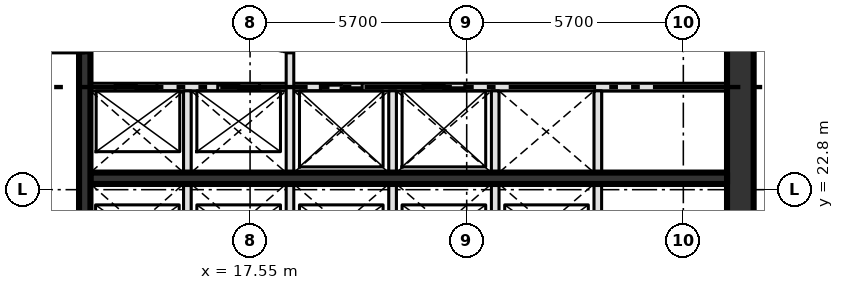
"""IFC4 building model, lengths in metres.
Left out: names, types, materials, properties, quantities, classifications, styles, units other than length and angle.
Written with IfcOpenShell. Run it as: python <this file> out.ifc"""

import sys

from ifc_helpers import new_model, si_unit, direction, frame, frame_2d, origin, place, context, subcontext, project, spatial, rectangle, extrude, element, fill, save


model = new_model("IFC4")
c1 = context("Model", 3, precision=1e-05, world=origin(), true_north=direction((0.0, 1.0)))
c2 = subcontext(c1, "Body", "Model", "MODEL_VIEW")
j1 = project(units=[si_unit("LENGTHUNIT", "METRE"), si_unit("PLANEANGLEUNIT", "RADIAN")], contexts=[c1])
p1 = place(None, origin())
s1 = spatial("IfcSite", under=j1, at=p1, CompositionType="ELEMENT")
p2 = place(p1, origin())
s2 = spatial("IfcBuilding", under=s1, at=p2, CompositionType="ELEMENT")
p3 = place(p2, frame((0.0, 0.0, 259.2)))
s3 = spatial("IfcBuildingStorey", under=s2, at=p3, CompositionType="ELEMENT", Elevation=259.2)
p4 = place(p3, frame((30.45, 14.8, -0.3), z_axis=(0.0, 0.0, 1.0), x_axis=(0.0, 1.0, 0.0)))
e1 = element("IfcWall", 1, at=p4, inside=s3, PredefinedType="SHEAR", context=c2, shape_type="SweptSolid", body=[
    extrude(rectangle(XDim=20.9, YDim=0.7, at=frame_2d((10.45, 0.0))), origin(), (0.0, 0.0, 1.0), 4.2),
])
p5 = place(p3, frame((13.35, 23.1, 0.0), z_axis=(0.0, 0.0, 1.0), x_axis=(1.0, 0.0, 0.0)))
e2 = element("IfcWall", 2, at=p5, inside=s3, PredefinedType="SHEAR", context=c2, shape_type="SweptSolid", body=[
    extrude(rectangle(XDim=16.75, YDim=0.3, at=frame_2d((8.375, 0.0))), origin(), (0.0, 0.0, 1.0), 3.9),
])
p6 = place(p3, frame((13.35, 25.5, 0.0), z_axis=(0.0, 0.0, 1.0), x_axis=(1.0, 0.0, 0.0)))
e3 = element("IfcWall", 3, at=p6, inside=s3, PredefinedType="SOLIDWALL", context=c2, shape_type="SweptSolid", body=[
    extrude(rectangle(XDim=16.75, YDim=0.2, at=frame_2d((8.375, 0.0))), origin(), (0.0, 0.0, 1.0), 3.9),
])
p7 = place(p6, frame((0.65, 0.0, 0.0)))
e4 = element("IfcOpeningElement", 4, at=p7, cuts=e3, PredefinedType="OPENING", context=c2, shape_type="SweptSolid", body=[
    extrude(rectangle(XDim=1.1, YDim=2.1, at=frame_2d((0.55, 1.05))), frame((0.0, 0.11, 0.0), z_axis=(0.0, -1.0, 0.0), x_axis=(1.0, 0.0, 0.0)), (0.0, 0.0, 1.0), 0.22),
])
p8 = place(p6, frame((3.35, 0.0, 0.0)))
e5 = element("IfcOpeningElement", 5, at=p8, cuts=e3, PredefinedType="OPENING", context=c2, shape_type="SweptSolid", body=[
    extrude(rectangle(XDim=1.1, YDim=2.1, at=frame_2d((0.55, 1.05))), frame((0.0, 0.11, 0.0), z_axis=(0.0, -1.0, 0.0), x_axis=(1.0, 0.0, 0.0)), (0.0, 0.0, 1.0), 0.22),
])
p9 = place(p6, frame((6.05, 0.0, 0.0)))
e6 = element("IfcOpeningElement", 6, at=p9, cuts=e3, PredefinedType="OPENING", context=c2, shape_type="SweptSolid", body=[
    extrude(rectangle(XDim=1.1, YDim=2.1, at=frame_2d((0.55, 1.05))), frame((0.0, 0.11, 0.0), z_axis=(0.0, -1.0, 0.0), x_axis=(1.0, 0.0, 0.0)), (0.0, 0.0, 1.0), 0.22),
])
p10 = place(p6, frame((8.75, 0.0, 0.0)))
e7 = element("IfcOpeningElement", 7, at=p10, cuts=e3, PredefinedType="OPENING", context=c2, shape_type="SweptSolid", body=[
    extrude(rectangle(XDim=1.1, YDim=2.1, at=frame_2d((0.55, 1.05))), frame((0.0, 0.11, 0.0), z_axis=(0.0, -1.0, 0.0), x_axis=(1.0, 0.0, 0.0)), (0.0, 0.0, 1.0), 0.22),
])
p11 = place(p3, frame((13.2, 14.8, 0.0), z_axis=(0.0, 0.0, 1.0), x_axis=(0.0, 1.0, 0.0)))
e8 = element("IfcWall", 8, at=p11, inside=s3, PredefinedType="SHEAR", context=c2, shape_type="SweptSolid", body=[
    extrude(rectangle(XDim=20.9, YDim=0.3, at=frame_2d((10.45, 0.0))), origin(), (0.0, 0.0, 1.0), 3.9),
])
p12 = place(p11, frame((3.5, 0.0, 0.0)))
e9 = element("IfcOpeningElement", 9, at=p12, cuts=e8, PredefinedType="OPENING", context=c2, shape_type="SweptSolid", body=[
    extrude(rectangle(XDim=1.8, YDim=2.1, at=frame_2d((0.9, 1.05))), frame((0.0, 0.16, 0.0), z_axis=(0.0, -1.0, 0.0), x_axis=(1.0, 0.0, 0.0)), (0.0, 0.0, 1.0), 0.32),
])
p13 = place(p11, frame((11.6, 0.0, 0.0)))
e10 = element("IfcOpeningElement", 10, at=p13, cuts=e8, PredefinedType="OPENING", context=c2, shape_type="SweptSolid", body=[
    extrude(rectangle(XDim=1.2, YDim=2.1, at=frame_2d((0.6, 1.05))), frame((0.0, 0.16, 0.0), z_axis=(0.0, -1.0, 0.0), x_axis=(1.0, 0.0, 0.0)), (0.0, 0.0, 1.0), 0.32),
])
p14 = place(p3, frame((15.9, 20.8, 0.0), z_axis=(0.0, 0.0, 1.0), x_axis=(0.0, 1.0, 0.0)))
e11 = element("IfcWall", 11, at=p14, inside=s3, PredefinedType="SOLIDWALL", context=c2, shape_type="SweptSolid", body=[
    extrude(rectangle(XDim=4.6, YDim=0.2, at=frame_2d((2.3, 0.0))), origin(), (0.0, 0.0, 1.0), 3.9),
])
p15 = place(p3, frame((18.6, 20.8, 0.0), z_axis=(0.0, 0.0, 1.0), x_axis=(0.0, 1.0, 0.0)))
e12 = element("IfcWall", 12, at=p15, inside=s3, PredefinedType="SOLIDWALL", context=c2, shape_type="SweptSolid", body=[
    extrude(rectangle(XDim=7.6, YDim=0.2, at=frame_2d((3.8, 0.0))), origin(), (0.0, 0.0, 1.0), 3.9),
])
p16 = place(p15, frame((5.6, 0.0, 0.0)))
e13 = element("IfcOpeningElement", 13, at=p16, cuts=e12, PredefinedType="OPENING", context=c2, shape_type="SweptSolid", body=[
    extrude(rectangle(XDim=1.2, YDim=2.1, at=frame_2d((0.6, 1.05))), frame((0.0, 0.11, 0.0), z_axis=(0.0, -1.0, 0.0), x_axis=(1.0, 0.0, 0.0)), (0.0, 0.0, 1.0), 0.22),
])
for number, where, z_axis, x_axis in (
    (14, (21.3, 20.8, 0.0), (0.0, 0.0, 1.0), (0.0, 1.0, 0.0)),
    (15, (24.0, 20.8, 0.0), (0.0, 0.0, 1.0), (0.0, 1.0, 0.0)),
    (16, (26.7, 20.8, 0.0), (0.0, 0.0, 1.0), (0.0, 1.0, 0.0)),
):
    element("IfcWall", number, at=place(p3, frame(where, z_axis=z_axis, x_axis=x_axis)), inside=s3, PredefinedType="SOLIDWALL", context=c2, shape_type="SweptSolid", body=[
        extrude(rectangle(XDim=4.6, YDim=0.2, at=frame_2d((2.3, 0.0))), origin(), (0.0, 0.0, 1.0), 3.9),
    ])
p17 = place(p7, origin())
e17 = element("IfcDoor", 17, at=p17, inside=s3, OperationType="SLIDING_TO_LEFT", PredefinedType="DOOR", context=c2, shape_type="SweptSolid", body=[
    extrude(rectangle(XDim=1.1, YDim=2.1, at=frame_2d((0.55, 1.05))), frame((0.0, 0.025, 0.0), z_axis=(0.0, -1.0, 0.0), x_axis=(1.0, 0.0, 0.0)), (0.0, 0.0, 1.0), 0.05),
])
fill(e4, e17)
p18 = place(p8, origin())
e18 = element("IfcDoor", 18, at=p18, inside=s3, OperationType="SLIDING_TO_LEFT", PredefinedType="DOOR", context=c2, shape_type="SweptSolid", body=[
    extrude(rectangle(XDim=1.1, YDim=2.1, at=frame_2d((0.55, 1.05))), frame((0.0, 0.025, 0.0), z_axis=(0.0, -1.0, 0.0), x_axis=(1.0, 0.0, 0.0)), (0.0, 0.0, 1.0), 0.05),
])
fill(e5, e18)
p19 = place(p9, origin())
e19 = element("IfcDoor", 19, at=p19, inside=s3, OperationType="SLIDING_TO_LEFT", PredefinedType="DOOR", context=c2, shape_type="SweptSolid", body=[
    extrude(rectangle(XDim=1.1, YDim=2.1, at=frame_2d((0.55, 1.05))), frame((0.0, 0.025, 0.0), z_axis=(0.0, -1.0, 0.0), x_axis=(1.0, 0.0, 0.0)), (0.0, 0.0, 1.0), 0.05),
])
fill(e6, e19)
p20 = place(p10, origin())
e20 = element("IfcDoor", 20, at=p20, inside=s3, OperationType="SLIDING_TO_LEFT", PredefinedType="DOOR", context=c2, shape_type="SweptSolid", body=[
    extrude(rectangle(XDim=1.1, YDim=2.1, at=frame_2d((0.55, 1.05))), frame((0.0, 0.025, 0.0), z_axis=(0.0, -1.0, 0.0), x_axis=(1.0, 0.0, 0.0)), (0.0, 0.0, 1.0), 0.05),
])
fill(e7, e20)
save(model, sys.argv[1])
